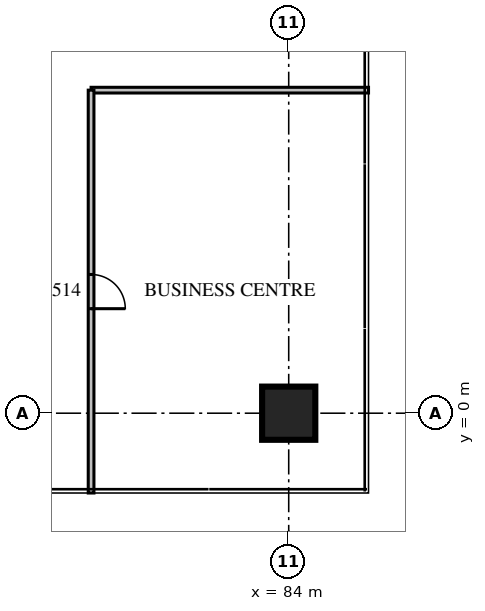
"""IFC4 building model, lengths in metres.
Left out: names, types, materials, properties, quantities, classifications, styles, units other than length and angle.
Written with IfcOpenShell. Run it as: python <this file> out.ifc"""

import sys

from ifc_helpers import new_model, si_unit, direction, frame, frame_2d, origin, origin_2d, place, context, subcontext, project, spatial, rectangle, extrude, source, transform, mapped, element, fill, save


model = new_model("IFC4")
c1 = context("Model", 3, precision=1e-05, world=origin(), true_north=direction((0.0, 1.0)))
c2 = subcontext(c1, "Body", "Model", "MODEL_VIEW")
j1 = project(units=[si_unit("LENGTHUNIT", "METRE"), si_unit("PLANEANGLEUNIT", "RADIAN")], contexts=[c1])
p1 = place(None, origin())
s1 = spatial("IfcSite", under=j1, at=p1, CompositionType="ELEMENT")
p2 = place(p1, origin())
s2 = spatial("IfcBuilding", under=s1, at=p2, CompositionType="ELEMENT")
p3 = place(p2, frame((0.0, 0.0, 12.9)))
s3 = spatial("IfcBuildingStorey", under=s2, at=p3, CompositionType="ELEMENT", Elevation=12.9)
m1 = source(origin(), c2, "Body", "SweptSolid", [
    extrude(rectangle(XDim=1.4, YDim=1.4, at=origin_2d()), origin(), (0.0, 0.0, 1.0), 5.4),
])
p4 = place(p3, frame((84.0, 0.0, 0.0), z_axis=(0.0, 0.0, 1.0), x_axis=(1.0, 0.0, 0.0)))
e1 = element("IfcColumn", 1, at=p4, inside=s3, PredefinedType="COLUMN", context=c2, shape_type="MappedRepresentation", body=[
    mapped(m1, transform((0.0, 0.0, 0.0), scale=1.0)),
])
m2 = source(origin(), c2, "Body", "SweptSolid", [
    extrude(rectangle(XDim=7.3, YDim=0.15, at=frame_2d((3.65, 0.0))), origin(), (0.0, 0.0, 1.0), 4.8),
])
p5 = place(p3, frame((78.8, 8.5, 0.0), z_axis=(0.0, 0.0, 1.0), x_axis=(1.0, 0.0, 0.0)))
e2 = element("IfcWall", 2, at=p5, inside=s3, PredefinedType="PARTITIONING", context=c2, shape_type="MappedRepresentation", body=[
    mapped(m2, transform((0.0, 0.0, 0.0), scale=1.0)),
])
m3 = source(origin(), c2, "Body", "SweptSolid", [
    extrude(rectangle(XDim=10.6, YDim=0.15, at=frame_2d((5.3, 0.0))), origin(), (0.0, 0.0, 1.0), 4.8),
])
p6 = place(p3, frame((78.8, -2.1, 0.0), z_axis=(0.0, 0.0, 1.0), x_axis=(0.0, 1.0, 0.0)))
e3 = element("IfcWall", 3, at=p6, inside=s3, PredefinedType="PARTITIONING", context=c2, shape_type="MappedRepresentation", body=[
    mapped(m3, transform((0.0, 0.0, 0.0), scale=1.0)),
])
m4 = source(origin(), c2, "Body", "SweptSolid", [
    extrude(rectangle(XDim=0.9, YDim=2.1, at=frame_2d((0.45, 1.05))), frame((0.0, 0.085, 0.0), z_axis=(0.0, -1.0, 0.0), x_axis=(1.0, 0.0, 0.0)), (0.0, 0.0, 1.0), 0.17),
])
p7 = place(p6, frame((4.85, 0.0, 0.0)))
e4 = element("IfcOpeningElement", 4, at=p7, cuts=e3, PredefinedType="OPENING", context=c2, shape_type="MappedRepresentation", body=[
    mapped(m4, transform((0.0, 0.0, 0.0), scale=1.0)),
])
m5 = source(origin(), c2, "Body", "SweptSolid", [
    extrude(rectangle(XDim=0.9, YDim=2.1, at=frame_2d((0.45, 1.05))), frame((0.0, 0.025, 0.0), z_axis=(0.0, -1.0, 0.0), x_axis=(1.0, 0.0, 0.0)), (0.0, 0.0, 1.0), 0.05),
])
p8 = place(p7, origin())
e5 = element("IfcDoor", 5, at=p8, inside=s3, OperationType="SINGLE_SWING_RIGHT", PredefinedType="DOOR", context=c2, shape_type="MappedRepresentation", body=[
    mapped(m5, transform((0.0, 0.0, 0.0), scale=1.0)),
])
fill(e4, e5)
save(model, sys.argv[1])
